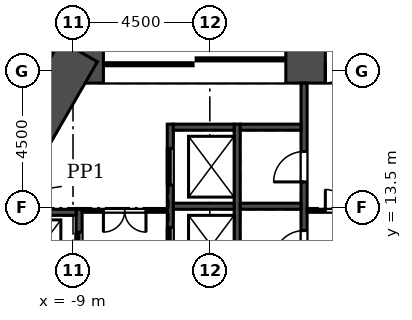
"""IFC4 building model, lengths in metres.
Left out: names, types, materials, properties, quantities, classifications, styles, units other than length and angle.
Written with IfcOpenShell. Run it as: python <this file> out.ifc"""

import sys

from ifc_helpers import new_model, si_unit, direction, frame, frame_2d, origin, place, context, subcontext, project, spatial, rectangle, extrude, element, fill, save


model = new_model("IFC4")
c1 = context("Model", 3, precision=1e-05, world=origin(), true_north=direction((0.0, 1.0)))
c2 = subcontext(c1, "Body", "Model", "MODEL_VIEW")
j1 = project(units=[si_unit("LENGTHUNIT", "METRE"), si_unit("PLANEANGLEUNIT", "RADIAN")], contexts=[c1])
p1 = place(None, origin())
s1 = spatial("IfcSite", under=j1, at=p1, CompositionType="ELEMENT")
p2 = place(p1, origin())
s2 = spatial("IfcBuilding", under=s1, at=p2, CompositionType="ELEMENT")
p3 = place(p2, frame((0.0, 0.0, -8.0)))
s3 = spatial("IfcBuildingStorey", under=s2, at=p3, CompositionType="ELEMENT", Elevation=-8.0)
p4 = place(p3, frame((-4.856, 74.528, 0.0), z_axis=(0.0, 0.0, 1.0), x_axis=(-0.499999312333, -0.866025800809, 0.0)))
e1 = element("IfcWall", 1, at=p4, inside=s3, PredefinedType="SOLIDWALL", context=c2, shape_type="SweptSolid", body=[
    extrude(rectangle(XDim=76.231, YDim=0.6, at=frame_2d((38.115, 0.0))), origin(), (0.0, 0.0, 1.0), 7.6),
])
p5 = place(p3, frame((9.412, 18.3, 0.0), z_axis=(0.0, 0.0, 1.0), x_axis=(-1.0, 0.0, 0.0)))
e2 = element("IfcWall", 2, at=p5, inside=s3, PredefinedType="SHEAR", context=c2, shape_type="SweptSolid", body=[
    extrude(rectangle(XDim=18.823, YDim=1.4, at=frame_2d((9.412, 0.0))), origin(), (0.0, 0.0, 1.0), 8.0),
])
p6 = place(p5, frame((8.711, 0.0, 0.0)))
e3 = element("IfcOpeningElement", 3, at=p6, cuts=e2, PredefinedType="OPENING", context=c2, shape_type="SweptSolid", body=[
    extrude(rectangle(XDim=1.4, YDim=2.1, at=frame_2d((0.7, 1.05))), frame((0.0, 0.71, 0.0), z_axis=(0.0, -1.0, 0.0), x_axis=(1.0, 0.0, 0.0)), (0.0, 0.0, 1.0), 1.42),
])
p7 = place(p5, frame((11.412, 0.0, 0.0)))
e4 = element("IfcOpeningElement", 4, at=p7, cuts=e2, PredefinedType="OPENING", context=c2, shape_type="SweptSolid", body=[
    extrude(rectangle(XDim=6.0, YDim=2.4, at=frame_2d((3.0, 1.2))), frame((0.0, 0.71, 0.0), z_axis=(0.0, -1.0, 0.0), x_axis=(1.0, 0.0, 0.0)), (0.0, 0.0, 1.0), 1.42),
])
p8 = place(p5, frame((1.412, 0.0, 0.0)))
e5 = element("IfcOpeningElement", 5, at=p8, cuts=e2, PredefinedType="OPENING", context=c2, shape_type="SweptSolid", body=[
    extrude(rectangle(XDim=6.0, YDim=2.4, at=frame_2d((3.0, 1.2))), frame((0.0, 0.71, 0.0), z_axis=(0.0, -1.0, 0.0), x_axis=(1.0, 0.0, 0.0)), (0.0, 0.0, 1.0), 1.42),
])
p9 = place(p3, frame((-8.805, 18.65, 0.0), z_axis=(0.0, 0.0, 1.0), x_axis=(-0.50000187635, -0.866024320471, 0.0)))
e6 = element("IfcWall", 6, at=p9, inside=s3, PredefinedType="SHEAR", context=c2, shape_type="SweptSolid", body=[
    extrude(rectangle(XDim=9.177, YDim=1.4, at=frame_2d((4.588, 0.0))), origin(), (0.0, 0.0, 1.0), 8.0),
])
p10 = place(p3, frame((-8.8, 8.25, -0.35), z_axis=(0.0, 0.0, 1.0), x_axis=(0.0, 1.0, 0.0)))
e7 = element("IfcWall", 7, at=p10, inside=s3, PredefinedType="SOLIDWALL", context=c2, shape_type="SweptSolid", body=[
    extrude(rectangle(XDim=5.2, YDim=0.2, at=frame_2d((2.6, 0.0))), origin(), (0.0, 0.0, 1.0), 7.95),
])
p11 = place(p10, frame((0.75, 0.0, 0.35)))
e8 = element("IfcOpeningElement", 8, at=p11, cuts=e7, PredefinedType="OPENING", context=c2, shape_type="SweptSolid", body=[
    extrude(rectangle(XDim=1.2, YDim=2.1, at=frame_2d((0.6, 1.05))), frame((0.0, 0.11, 0.0), z_axis=(0.0, -1.0, 0.0), x_axis=(1.0, 0.0, 0.0)), (0.0, 0.0, 1.0), 0.22),
])
p12 = place(p10, frame((3.25, 0.0, 0.35)))
e9 = element("IfcOpeningElement", 9, at=p12, cuts=e7, PredefinedType="OPENING", context=c2, shape_type="SweptSolid", body=[
    extrude(rectangle(XDim=1.2, YDim=2.1, at=frame_2d((0.6, 1.05))), frame((0.0, 0.11, 0.0), z_axis=(0.0, -1.0, 0.0), x_axis=(1.0, 0.0, 0.0)), (0.0, 0.0, 1.0), 0.22),
])
p13 = place(p3, frame((-5.8, 8.25, -0.35), z_axis=(0.0, 0.0, 1.0), x_axis=(0.0, 1.0, 0.0)))
e10 = element("IfcWall", 10, at=p13, inside=s3, PredefinedType="SOLIDWALL", context=c2, shape_type="SweptSolid", body=[
    extrude(rectangle(XDim=8.0, YDim=0.2, at=frame_2d((4.0, 0.0))), origin(), (0.0, 0.0, 1.0), 7.95),
])
p14 = place(p13, frame((0.8, 0.0, 0.35)))
e11 = element("IfcOpeningElement", 11, at=p14, cuts=e10, PredefinedType="OPENING", context=c2, shape_type="SweptSolid", body=[
    extrude(rectangle(XDim=1.2, YDim=2.1, at=frame_2d((0.6, 1.05))), frame((0.0, 0.11, 0.0), z_axis=(0.0, -1.0, 0.0), x_axis=(1.0, 0.0, 0.0)), (0.0, 0.0, 1.0), 0.22),
])
p15 = place(p13, frame((3.4, 0.0, 0.35)))
e12 = element("IfcOpeningElement", 12, at=p15, cuts=e10, PredefinedType="OPENING", context=c2, shape_type="SweptSolid", body=[
    extrude(rectangle(XDim=1.2, YDim=2.1, at=frame_2d((0.6, 1.05))), frame((0.0, 0.11, 0.0), z_axis=(0.0, -1.0, 0.0), x_axis=(1.0, 0.0, 0.0)), (0.0, 0.0, 1.0), 0.22),
])
p16 = place(p13, frame((6.0, 0.0, 0.35)))
e13 = element("IfcOpeningElement", 13, at=p16, cuts=e10, PredefinedType="OPENING", context=c2, shape_type="SweptSolid", body=[
    extrude(rectangle(XDim=1.2, YDim=2.1, at=frame_2d((0.6, 1.05))), frame((0.0, 0.11, 0.0), z_axis=(0.0, -1.0, 0.0), x_axis=(1.0, 0.0, 0.0)), (0.0, 0.0, 1.0), 0.22),
])
p17 = place(p3, frame((-3.6, 8.45, -0.35), z_axis=(0.0, 0.0, 1.0), x_axis=(0.0, 1.0, 0.0)))
e14 = element("IfcWall", 14, at=p17, inside=s3, PredefinedType="SOLIDWALL", context=c2, shape_type="SweptSolid", body=[
    extrude(rectangle(XDim=7.8, YDim=0.2, at=frame_2d((3.9, 0.0))), origin(), (0.0, 0.0, 1.0), 7.95),
])
p18 = place(p3, frame((-1.4, 5.85, -0.35), z_axis=(0.0, 0.0, 1.0), x_axis=(0.0, 1.0, 0.0)))
e15 = element("IfcWall", 15, at=p18, inside=s3, PredefinedType="SOLIDWALL", context=c2, shape_type="SweptSolid", body=[
    extrude(rectangle(XDim=11.75, YDim=0.2, at=frame_2d((5.875, 0.0))), origin(), (0.0, 0.0, 1.0), 7.95),
])
p19 = place(p18, frame((3.2, 0.0, 0.35)))
e16 = element("IfcOpeningElement", 16, at=p19, cuts=e15, PredefinedType="OPENING", context=c2, shape_type="SweptSolid", body=[
    extrude(rectangle(XDim=1.2, YDim=2.1, at=frame_2d((0.6, 1.05))), frame((0.0, 0.11, 0.0), z_axis=(0.0, -1.0, 0.0), x_axis=(1.0, 0.0, 0.0)), (0.0, 0.0, 1.0), 0.22),
])
p20 = place(p18, frame((0.65, 0.0, 0.35)))
e17 = element("IfcOpeningElement", 17, at=p20, cuts=e15, PredefinedType="OPENING", context=c2, shape_type="SweptSolid", body=[
    extrude(rectangle(XDim=1.1, YDim=2.1, at=frame_2d((0.55, 1.05))), frame((0.0, 0.11, 0.0), z_axis=(0.0, -1.0, 0.0), x_axis=(1.0, 0.0, 0.0)), (0.0, 0.0, 1.0), 0.22),
])
p21 = place(p18, frame((5.9, 0.0, 0.35)))
e18 = element("IfcOpeningElement", 18, at=p21, cuts=e15, PredefinedType="OPENING", context=c2, shape_type="SweptSolid", body=[
    extrude(rectangle(XDim=1.0, YDim=2.1, at=frame_2d((0.5, 1.05))), frame((0.0, 0.11, 0.0), z_axis=(0.0, -1.0, 0.0), x_axis=(1.0, 0.0, 0.0)), (0.0, 0.0, 1.0), 0.22),
])
p22 = place(p18, frame((8.5, 0.0, 0.35)))
e19 = element("IfcOpeningElement", 19, at=p22, cuts=e15, PredefinedType="OPENING", context=c2, shape_type="SweptSolid", body=[
    extrude(rectangle(XDim=1.0, YDim=2.1, at=frame_2d((0.5, 1.05))), frame((0.0, 0.11, 0.0), z_axis=(0.0, -1.0, 0.0), x_axis=(1.0, 0.0, 0.0)), (0.0, 0.0, 1.0), 0.22),
])
for number, where, z_axis, x_axis in (
    (20, (-10.9, 13.35, -0.35), (0.0, 0.0, 1.0), (1.0, 0.0, 0.0)),
    (21, (-5.7, 13.55, -0.35), (0.0, 0.0, 1.0), (1.0, 0.0, 0.0)),
    (22, (-5.7, 16.15, -0.35), (0.0, 0.0, 1.0), (1.0, 0.0, 0.0)),
    (23, (-3.5, 13.55, -0.35), (0.0, 0.0, 1.0), (1.0, 0.0, 0.0)),
    (24, (-3.5, 16.15, -0.35), (0.0, 0.0, 1.0), (1.0, 0.0, 0.0)),
):
    element("IfcWall", number, at=place(p3, frame(where, z_axis=z_axis, x_axis=x_axis)), inside=s3, PredefinedType="SOLIDWALL", context=c2, shape_type="SweptSolid", body=[
        extrude(rectangle(XDim=2.0, YDim=0.2, at=frame_2d((1.0, 0.0))), origin(), (0.0, 0.0, 1.0), 7.95),
    ])
p23 = place(p3, frame((-8.7, 13.4, 0.0), z_axis=(0.0, 0.0, 1.0), x_axis=(1.0, 0.0, 0.0)))
e25 = element("IfcWall", 25, at=p23, inside=s3, PredefinedType="PARTITIONING", context=c2, shape_type="SweptSolid", body=[
    extrude(rectangle(XDim=2.8, YDim=0.1, at=frame_2d((1.4, 0.0))), origin(), (0.0, 0.0, 1.0), 7.6),
])
p24 = place(p23, frame((0.7, 0.0, 0.0)))
e26 = element("IfcOpeningElement", 26, at=p24, cuts=e25, PredefinedType="OPENING", context=c2, shape_type="SweptSolid", body=[
    extrude(rectangle(XDim=1.4, YDim=2.1, at=frame_2d((0.7, 1.05))), frame((0.0, 0.06, 0.0), z_axis=(0.0, -1.0, 0.0), x_axis=(1.0, 0.0, 0.0)), (0.0, 0.0, 1.0), 0.12),
])
p25 = place(p3, frame((-1.3, 13.4, 0.0), z_axis=(0.0, 0.0, 1.0), x_axis=(1.0, 0.0, 0.0)))
e27 = element("IfcWall", 27, at=p25, inside=s3, PredefinedType="PARTITIONING", context=c2, shape_type="SweptSolid", body=[
    extrude(rectangle(XDim=2.6, YDim=0.1, at=frame_2d((1.3, 0.0))), origin(), (0.0, 0.0, 1.0), 7.6),
])
p26 = place(p25, frame((0.6, 0.0, 0.0)))
e28 = element("IfcOpeningElement", 28, at=p26, cuts=e27, PredefinedType="OPENING", context=c2, shape_type="SweptSolid", body=[
    extrude(rectangle(XDim=1.4, YDim=2.1, at=frame_2d((0.7, 1.05))), frame((0.0, 0.06, 0.0), z_axis=(0.0, -1.0, 0.0), x_axis=(1.0, 0.0, 0.0)), (0.0, 0.0, 1.0), 0.12),
])
p27 = place(p12, origin())
e29 = element("IfcDoor", 29, at=p27, inside=s3, OperationType="SLIDING_TO_LEFT", PredefinedType="DOOR", context=c2, shape_type="SweptSolid", body=[
    extrude(rectangle(XDim=1.2, YDim=2.1, at=frame_2d((0.6, 1.05))), frame((0.0, 0.025, 0.0), z_axis=(0.0, -1.0, 0.0), x_axis=(1.0, 0.0, 0.0)), (0.0, 0.0, 1.0), 0.05),
])
fill(e9, e29)
p28 = place(p15, origin())
e30 = element("IfcDoor", 30, at=p28, inside=s3, OperationType="SLIDING_TO_LEFT", PredefinedType="DOOR", context=c2, shape_type="SweptSolid", body=[
    extrude(rectangle(XDim=1.2, YDim=2.1, at=frame_2d((0.6, 1.05))), frame((0.0, 0.025, 0.0), z_axis=(0.0, -1.0, 0.0), x_axis=(1.0, 0.0, 0.0)), (0.0, 0.0, 1.0), 0.05),
])
fill(e12, e30)
p29 = place(p16, origin())
e31 = element("IfcDoor", 31, at=p29, inside=s3, OperationType="SLIDING_TO_LEFT", PredefinedType="DOOR", context=c2, shape_type="SweptSolid", body=[
    extrude(rectangle(XDim=1.2, YDim=2.1, at=frame_2d((0.6, 1.05))), frame((0.0, 0.025, 0.0), z_axis=(0.0, -1.0, 0.0), x_axis=(1.0, 0.0, 0.0)), (0.0, 0.0, 1.0), 0.05),
])
fill(e13, e31)
p30 = place(p21, origin())
e32 = element("IfcDoor", 32, at=p30, inside=s3, OperationType="SINGLE_SWING_LEFT", PredefinedType="DOOR", context=c2, shape_type="SweptSolid", body=[
    extrude(rectangle(XDim=1.0, YDim=2.1, at=frame_2d((0.5, 1.05))), frame((0.0, 0.025, 0.0), z_axis=(0.0, -1.0, 0.0), x_axis=(1.0, 0.0, 0.0)), (0.0, 0.0, 1.0), 0.05),
])
fill(e18, e32)
p31 = place(p22, origin())
e33 = element("IfcDoor", 33, at=p31, inside=s3, OperationType="SINGLE_SWING_LEFT", PredefinedType="DOOR", context=c2, shape_type="SweptSolid", body=[
    extrude(rectangle(XDim=1.0, YDim=2.1, at=frame_2d((0.5, 1.05))), frame((0.0, 0.025, 0.0), z_axis=(0.0, -1.0, 0.0), x_axis=(1.0, 0.0, 0.0)), (0.0, 0.0, 1.0), 0.05),
])
fill(e19, e33)
p32 = place(p24, frame((1.4, 0.0, 0.0), z_axis=(0.0, 0.0, 1.0), x_axis=(-1.0, 0.0, 0.0)))
e34 = element("IfcDoor", 34, at=p32, inside=s3, OperationType="DOUBLE_DOOR_SINGLE_SWING", PredefinedType="DOOR", context=c2, shape_type="SweptSolid", body=[
    extrude(rectangle(XDim=1.4, YDim=2.1, at=frame_2d((0.7, 1.05))), frame((0.0, 0.025, 0.0), z_axis=(0.0, -1.0, 0.0), x_axis=(1.0, 0.0, 0.0)), (0.0, 0.0, 1.0), 0.05),
])
fill(e26, e34)
p33 = place(p26, origin())
e35 = element("IfcDoor", 35, at=p33, inside=s3, OperationType="DOUBLE_DOOR_SINGLE_SWING", PredefinedType="DOOR", context=c2, shape_type="SweptSolid", body=[
    extrude(rectangle(XDim=1.4, YDim=2.1, at=frame_2d((0.7, 1.05))), frame((0.0, 0.025, 0.0), z_axis=(0.0, -1.0, 0.0), x_axis=(1.0, 0.0, 0.0)), (0.0, 0.0, 1.0), 0.05),
])
fill(e28, e35)
p34 = place(p6, origin())
e36 = element("IfcDoor", 36, at=p34, inside=s3, OperationType="DOUBLE_DOOR_SINGLE_SWING", PredefinedType="DOOR", context=c2, shape_type="SweptSolid", body=[
    extrude(rectangle(XDim=1.4, YDim=2.1, at=frame_2d((0.7, 1.05))), frame((0.0, 0.025, 0.0), z_axis=(0.0, -1.0, 0.0), x_axis=(1.0, 0.0, 0.0)), (0.0, 0.0, 1.0), 0.05),
])
fill(e3, e36)
p35 = place(p7, origin())
e37 = element("IfcDoor", 37, at=p35, inside=s3, OperationType="DOUBLE_DOOR_SLIDING", PredefinedType="DOOR", context=c2, shape_type="SweptSolid", body=[
    extrude(rectangle(XDim=6.0, YDim=2.4, at=frame_2d((3.0, 1.2))), frame((0.0, 0.025, 0.0), z_axis=(0.0, -1.0, 0.0), x_axis=(1.0, 0.0, 0.0)), (0.0, 0.0, 1.0), 0.05),
])
fill(e4, e37)
save(model, sys.argv[1])
